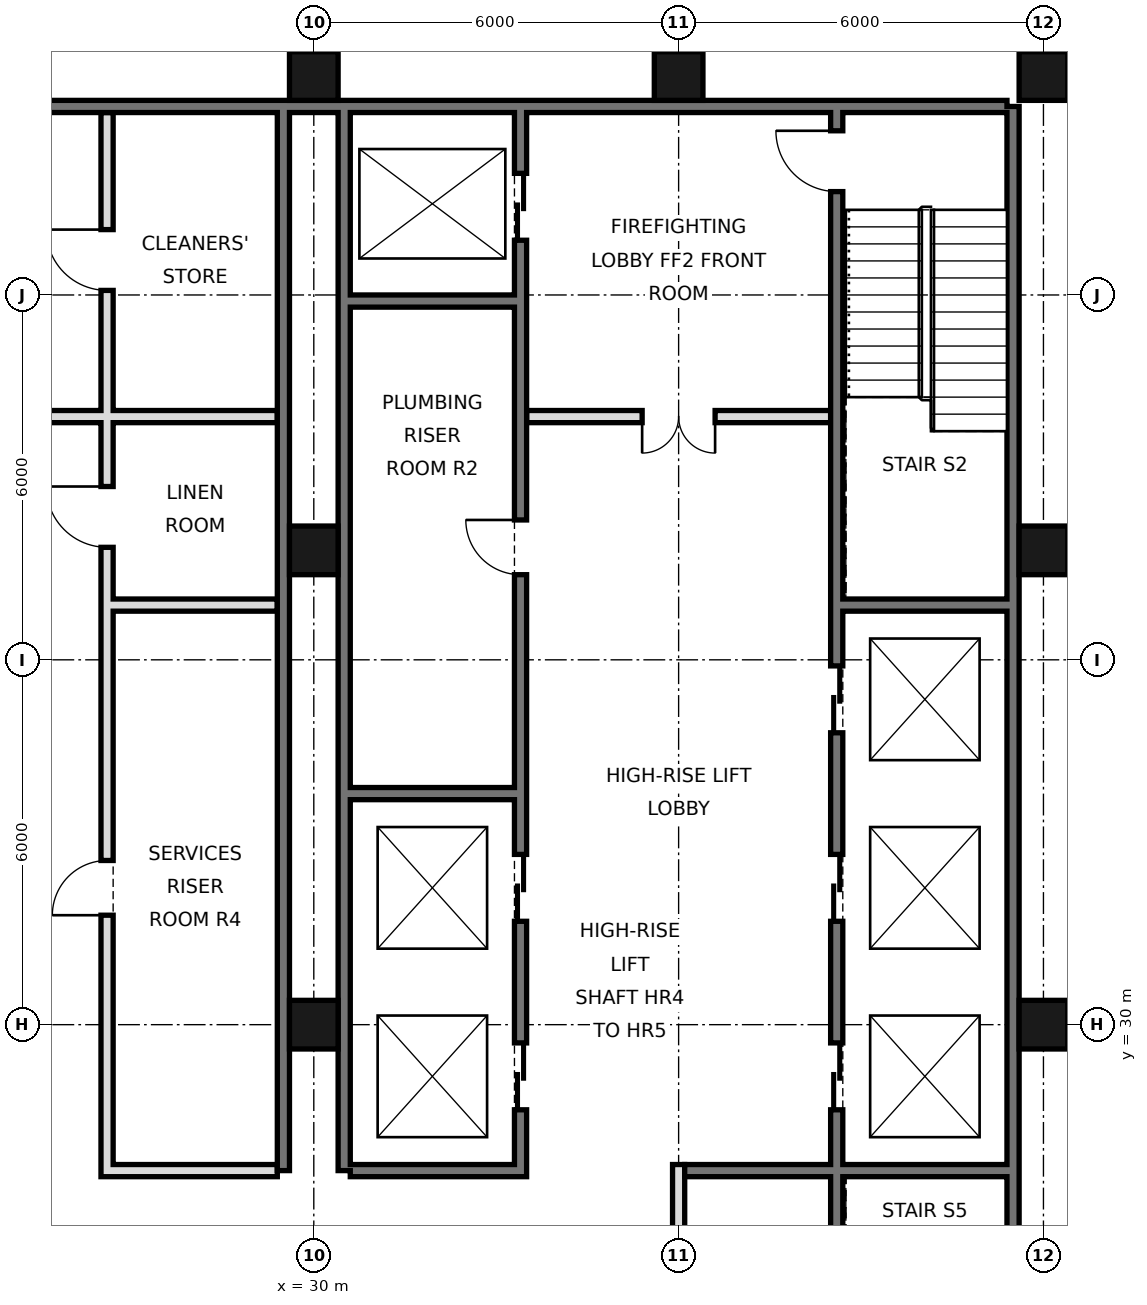
"""IFC4 building model, lengths in metres.
Left out: names, types, materials, properties, quantities, classifications, styles, units other than length and angle.
Written with IfcOpenShell. Run it as: python <this file> out.ifc"""

import sys

from ifc_helpers import new_model, si_unit, direction, frame, frame_2d, origin, origin_2d, place, context, subcontext, project, spatial, rectangle, hollow_rectangle, extrude, element, fill, save


model = new_model("IFC4")
c1 = context("Model", 3, precision=1e-05, world=origin(), true_north=direction((0.0, 1.0)))
c2 = subcontext(c1, "Body", "Model", "MODEL_VIEW")
j1 = project(units=[si_unit("LENGTHUNIT", "METRE"), si_unit("PLANEANGLEUNIT", "RADIAN")], contexts=[c1])
p1 = place(None, origin())
s1 = spatial("IfcSite", under=j1, at=p1, CompositionType="ELEMENT")
p2 = place(p1, origin())
s2 = spatial("IfcBuilding", under=s1, at=p2, CompositionType="ELEMENT")
p3 = place(p2, frame((0.0, 0.0, 326.8)))
s3 = spatial("IfcBuildingStorey", under=s2, at=p3, CompositionType="ELEMENT", Elevation=326.8)
for number, where, z_axis, x_axis in (
    (1, (30.0, 30.0, 0.0), (0.0, 0.0, 1.0), (1.0, 0.0, 0.0)),
    (2, (30.0, 37.8, 0.0), (0.0, 0.0, 1.0), (1.0, 0.0, 0.0)),
    (3, (30.0, 45.6, 0.0), (0.0, 0.0, 1.0), (1.0, 0.0, 0.0)),
    (4, (36.0, 45.6, 0.0), (0.0, 0.0, 1.0), (1.0, 0.0, 0.0)),
    (5, (42.0, 30.0, 0.0), (0.0, 0.0, 1.0), (1.0, 0.0, 0.0)),
    (6, (42.0, 37.8, 0.0), (0.0, 0.0, 1.0), (1.0, 0.0, 0.0)),
    (7, (42.0, 45.6, 0.0), (0.0, 0.0, 1.0), (1.0, 0.0, 0.0)),
):
    element("IfcColumn", number, at=place(p3, frame(where, z_axis=z_axis, x_axis=x_axis)), inside=s3, PredefinedType="COLUMN", context=c2, shape_type="SweptSolid", body=[
        extrude(hollow_rectangle(XDim=0.8, YDim=0.8, WallThickness=0.025, at=origin_2d()), origin(), (0.0, 0.0, 1.0), 4.4),
    ])
p4 = place(p3, frame((41.5, 21.6, 0.0), z_axis=(0.0, 0.0, 1.0), x_axis=(0.0, 1.0, 0.0)))
e8 = element("IfcWall", 8, at=p4, inside=s3, PredefinedType="SOLIDWALL", context=c2, shape_type="SweptSolid", body=[
    extrude(rectangle(XDim=23.5, YDim=0.2, at=frame_2d((11.75, 0.0))), origin(), (0.0, 0.0, 1.0), 4.1),
])
p5 = place(p3, frame((6.6, 45.1, 0.0), z_axis=(0.0, 0.0, 1.0), x_axis=(1.0, 0.0, 0.0)))
e9 = element("IfcWall", 9, at=p5, inside=s3, PredefinedType="SOLIDWALL", context=c2, shape_type="SweptSolid", body=[
    extrude(rectangle(XDim=34.8, YDim=0.2, at=frame_2d((17.4, 0.0))), origin(), (0.0, 0.0, 1.0), 4.1),
])
for number, where, z_axis, x_axis in (
    (10, (29.5, 27.6, 0.0), (0.0, 0.0, 1.0), (0.0, 1.0, 0.0)),
    (11, (30.5, 27.6, 0.0), (0.0, 0.0, 1.0), (0.0, 1.0, 0.0)),
):
    element("IfcWall", number, at=place(p3, frame(where, z_axis=z_axis, x_axis=x_axis)), inside=s3, PredefinedType="SOLIDWALL", context=c2, shape_type="SweptSolid", body=[
        extrude(rectangle(XDim=17.5, YDim=0.2, at=frame_2d((8.75, 0.0))), origin(), (0.0, 0.0, 1.0), 4.1),
    ])
p6 = place(p3, frame((26.6, 27.5, 0.0), z_axis=(0.0, 0.0, 1.0), x_axis=(0.0, 1.0, 0.0)))
e12 = element("IfcWall", 12, at=p6, inside=s3, PredefinedType="SOLIDWALL", context=c2, shape_type="SweptSolid", body=[
    extrude(rectangle(XDim=17.5, YDim=0.2, at=frame_2d((8.75, 0.0))), origin(), (0.0, 0.0, 1.0), 4.1),
])
p7 = place(p6, frame((4.3, 0.0, 0.0)))
e13 = element("IfcOpeningElement", 13, at=p7, cuts=e12, PredefinedType="OPENING", context=c2, shape_type="SweptSolid", body=[
    extrude(rectangle(XDim=0.9, YDim=2.1, at=frame_2d((0.45, 1.05))), frame((0.0, 0.11, 0.0), z_axis=(0.0, -1.0, 0.0), x_axis=(1.0, 0.0, 0.0)), (0.0, 0.0, 1.0), 0.22),
])
p8 = place(p6, frame((10.35, 0.0, 0.0)))
e14 = element("IfcOpeningElement", 14, at=p8, cuts=e12, PredefinedType="OPENING", context=c2, shape_type="SweptSolid", body=[
    extrude(rectangle(XDim=1.0, YDim=2.1, at=frame_2d((0.5, 1.05))), frame((0.0, 0.11, 0.0), z_axis=(0.0, -1.0, 0.0), x_axis=(1.0, 0.0, 0.0)), (0.0, 0.0, 1.0), 0.22),
])
p9 = place(p6, frame((14.575, 0.0, 0.0)))
e15 = element("IfcOpeningElement", 15, at=p9, cuts=e12, PredefinedType="OPENING", context=c2, shape_type="SweptSolid", body=[
    extrude(rectangle(XDim=1.0, YDim=2.1, at=frame_2d((0.5, 1.05))), frame((0.0, 0.11, 0.0), z_axis=(0.0, -1.0, 0.0), x_axis=(1.0, 0.0, 0.0)), (0.0, 0.0, 1.0), 0.22),
])
p10 = place(p3, frame((33.4, 27.5, 0.0), z_axis=(0.0, 0.0, 1.0), x_axis=(0.0, 1.0, 0.0)))
e16 = element("IfcWall", 16, at=p10, inside=s3, PredefinedType="SOLIDWALL", context=c2, shape_type="SweptSolid", body=[
    extrude(rectangle(XDim=17.5, YDim=0.2, at=frame_2d((8.75, 0.0))), origin(), (0.0, 0.0, 1.0), 4.1),
])
p11 = place(p10, frame((1.1, 0.0, 0.0)))
e17 = element("IfcOpeningElement", 17, at=p11, cuts=e16, PredefinedType="OPENING", context=c2, shape_type="SweptSolid", body=[
    extrude(rectangle(XDim=1.1, YDim=2.1, at=frame_2d((0.55, 1.05))), frame((0.0, 0.11, 0.0), z_axis=(0.0, -1.0, 0.0), x_axis=(1.0, 0.0, 0.0)), (0.0, 0.0, 1.0), 0.22),
])
p12 = place(p10, frame((4.2, 0.0, 0.0)))
e18 = element("IfcOpeningElement", 18, at=p12, cuts=e16, PredefinedType="OPENING", context=c2, shape_type="SweptSolid", body=[
    extrude(rectangle(XDim=1.1, YDim=2.1, at=frame_2d((0.55, 1.05))), frame((0.0, 0.11, 0.0), z_axis=(0.0, -1.0, 0.0), x_axis=(1.0, 0.0, 0.0)), (0.0, 0.0, 1.0), 0.22),
])
p13 = place(p10, frame((15.4, 0.0, 0.0)))
e19 = element("IfcOpeningElement", 19, at=p13, cuts=e16, PredefinedType="OPENING", context=c2, shape_type="SweptSolid", body=[
    extrude(rectangle(XDim=1.1, YDim=2.1, at=frame_2d((0.55, 1.05))), frame((0.0, 0.11, 0.0), z_axis=(0.0, -1.0, 0.0), x_axis=(1.0, 0.0, 0.0)), (0.0, 0.0, 1.0), 0.22),
])
p14 = place(p10, frame((9.9, 0.0, 0.0)))
e20 = element("IfcOpeningElement", 20, at=p14, cuts=e16, PredefinedType="OPENING", context=c2, shape_type="SweptSolid", body=[
    extrude(rectangle(XDim=0.9, YDim=2.1, at=frame_2d((0.45, 1.05))), frame((0.0, 0.11, 0.0), z_axis=(0.0, -1.0, 0.0), x_axis=(1.0, 0.0, 0.0)), (0.0, 0.0, 1.0), 0.22),
])
p15 = place(p3, frame((36.0, 21.6, 0.0), z_axis=(0.0, 0.0, 1.0), x_axis=(0.0, 1.0, 0.0)))
e21 = element("IfcWall", 21, at=p15, inside=s3, PredefinedType="PARTITIONING", context=c2, shape_type="SweptSolid", body=[
    extrude(rectangle(XDim=6.1, YDim=0.2, at=frame_2d((3.05, 0.0))), origin(), (0.0, 0.0, 1.0), 4.1),
])
p16 = place(p3, frame((38.6, 21.6, 0.0), z_axis=(0.0, 0.0, 1.0), x_axis=(0.0, 1.0, 0.0)))
e22 = element("IfcWall", 22, at=p16, inside=s3, PredefinedType="SOLIDWALL", context=c2, shape_type="SweptSolid", body=[
    extrude(rectangle(XDim=23.4, YDim=0.2, at=frame_2d((11.7, 0.0))), origin(), (0.0, 0.0, 1.0), 4.1),
])
p17 = place(p16, frame((7.0, 0.0, 0.0)))
e23 = element("IfcOpeningElement", 23, at=p17, cuts=e22, PredefinedType="OPENING", context=c2, shape_type="SweptSolid", body=[
    extrude(rectangle(XDim=1.1, YDim=2.1, at=frame_2d((0.55, 1.05))), frame((0.0, 0.11, 0.0), z_axis=(0.0, -1.0, 0.0), x_axis=(1.0, 0.0, 0.0)), (0.0, 0.0, 1.0), 0.22),
])
p18 = place(p16, frame((10.1, 0.0, 0.0)))
e24 = element("IfcOpeningElement", 24, at=p18, cuts=e22, PredefinedType="OPENING", context=c2, shape_type="SweptSolid", body=[
    extrude(rectangle(XDim=1.1, YDim=2.1, at=frame_2d((0.55, 1.05))), frame((0.0, 0.11, 0.0), z_axis=(0.0, -1.0, 0.0), x_axis=(1.0, 0.0, 0.0)), (0.0, 0.0, 1.0), 0.22),
])
p19 = place(p16, frame((13.2, 0.0, 0.0)))
e25 = element("IfcOpeningElement", 25, at=p19, cuts=e22, PredefinedType="OPENING", context=c2, shape_type="SweptSolid", body=[
    extrude(rectangle(XDim=1.1, YDim=2.1, at=frame_2d((0.55, 1.05))), frame((0.0, 0.11, 0.0), z_axis=(0.0, -1.0, 0.0), x_axis=(1.0, 0.0, 0.0)), (0.0, 0.0, 1.0), 0.22),
])
p20 = place(p16, frame((22.1, 0.0, 0.0)))
e26 = element("IfcOpeningElement", 26, at=p20, cuts=e22, PredefinedType="OPENING", context=c2, shape_type="SweptSolid", body=[
    extrude(rectangle(XDim=1.0, YDim=2.1, at=frame_2d((0.5, 1.05))), frame((0.0, 0.11, 0.0), z_axis=(0.0, -1.0, 0.0), x_axis=(1.0, 0.0, 0.0)), (0.0, 0.0, 1.0), 0.22),
])
p21 = place(p16, frame((0.175, 0.0, 0.0)))
e27 = element("IfcOpeningElement", 27, at=p21, cuts=e22, PredefinedType="OPENING", context=c2, shape_type="SweptSolid", body=[
    extrude(rectangle(XDim=0.9, YDim=2.1, at=frame_2d((0.45, 1.05))), frame((0.0, 0.11, 0.0), z_axis=(0.0, -1.0, 0.0), x_axis=(1.0, 0.0, 0.0)), (0.0, 0.0, 1.0), 0.22),
])
for number, where, z_axis, x_axis in (
    (28, (26.7, 27.6, 0.0), (0.0, 0.0, 1.0), (1.0, 0.0, 0.0)),
    (29, (30.6, 27.6, 0.0), (0.0, 0.0, 1.0), (1.0, 0.0, 0.0)),
):
    element("IfcWall", number, at=place(p3, frame(where, z_axis=z_axis, x_axis=x_axis)), inside=s3, PredefinedType="SOLIDWALL", context=c2, shape_type="SweptSolid", body=[
        extrude(rectangle(XDim=2.7, YDim=0.2, at=frame_2d((1.35, 0.0))), origin(), (0.0, 0.0, 1.0), 4.1),
    ])
p22 = place(p3, frame((36.1, 27.6, 0.0), z_axis=(0.0, 0.0, 1.0), x_axis=(1.0, 0.0, 0.0)))
e30 = element("IfcWall", 30, at=p22, inside=s3, PredefinedType="SOLIDWALL", context=c2, shape_type="SweptSolid", body=[
    extrude(rectangle(XDim=5.3, YDim=0.2, at=frame_2d((2.65, 0.0))), origin(), (0.0, 0.0, 1.0), 4.1),
])
for number, where, z_axis, x_axis in (
    (31, (30.6, 33.8, 0.0), (0.0, 0.0, 1.0), (1.0, 0.0, 0.0)),
    (32, (26.7, 36.9, 0.0), (0.0, 0.0, 1.0), (1.0, 0.0, 0.0)),
    (33, (38.7, 36.9, 0.0), (0.0, 0.0, 1.0), (1.0, 0.0, 0.0)),
):
    element("IfcWall", number, at=place(p3, frame(where, z_axis=z_axis, x_axis=x_axis)), inside=s3, PredefinedType="SOLIDWALL", context=c2, shape_type="SweptSolid", body=[
        extrude(rectangle(XDim=2.7, YDim=0.2, at=frame_2d((1.35, 0.0))), origin(), (0.0, 0.0, 1.0), 4.1),
    ])
p23 = place(p3, frame((21.5, 40.0, 0.0), z_axis=(0.0, 0.0, 1.0), x_axis=(1.0, 0.0, 0.0)))
e34 = element("IfcWall", 34, at=p23, inside=s3, PredefinedType="PARTITIONING", context=c2, shape_type="SweptSolid", body=[
    extrude(rectangle(XDim=7.9, YDim=0.2, at=frame_2d((3.95, 0.0))), origin(), (0.0, 0.0, 1.0), 4.1),
])
p24 = place(p23, frame((1.9, 0.0, 0.0)))
e35 = element("IfcOpeningElement", 35, at=p24, cuts=e34, PredefinedType="OPENING", context=c2, shape_type="SweptSolid", body=[
    extrude(rectangle(XDim=1.2, YDim=2.1, at=frame_2d((0.6, 1.05))), frame((0.0, 0.11, 0.0), z_axis=(0.0, -1.0, 0.0), x_axis=(1.0, 0.0, 0.0)), (0.0, 0.0, 1.0), 0.22),
])
p25 = place(p3, frame((33.5, 40.0, 0.0), z_axis=(0.0, 0.0, 1.0), x_axis=(1.0, 0.0, 0.0)))
e36 = element("IfcWall", 36, at=p25, inside=s3, PredefinedType="PARTITIONING", context=c2, shape_type="SweptSolid", body=[
    extrude(rectangle(XDim=5.0, YDim=0.2, at=frame_2d((2.5, 0.0))), origin(), (0.0, 0.0, 1.0), 4.1),
])
p26 = place(p25, frame((1.9, 0.0, 0.0)))
e37 = element("IfcOpeningElement", 37, at=p26, cuts=e36, PredefinedType="OPENING", context=c2, shape_type="SweptSolid", body=[
    extrude(rectangle(XDim=1.2, YDim=2.1, at=frame_2d((0.6, 1.05))), frame((0.0, 0.11, 0.0), z_axis=(0.0, -1.0, 0.0), x_axis=(1.0, 0.0, 0.0)), (0.0, 0.0, 1.0), 0.22),
])
p27 = place(p3, frame((30.6, 41.9, 0.0), z_axis=(0.0, 0.0, 1.0), x_axis=(1.0, 0.0, 0.0)))
e38 = element("IfcWall", 38, at=p27, inside=s3, PredefinedType="SOLIDWALL", context=c2, shape_type="SweptSolid", body=[
    extrude(rectangle(XDim=2.7, YDim=0.2, at=frame_2d((1.35, 0.0))), origin(), (0.0, 0.0, 1.0), 4.1),
])
p28 = place(p26, frame((1.2, 0.0, 0.0), z_axis=(0.0, 0.0, 1.0), x_axis=(-1.0, 0.0, 0.0)))
e39 = element("IfcDoor", 39, at=p28, inside=s3, OperationType="DOUBLE_DOOR_SINGLE_SWING", PredefinedType="DOOR", context=c2, shape_type="SweptSolid", body=[
    extrude(rectangle(XDim=1.2, YDim=2.1, at=frame_2d((0.6, 1.05))), frame((0.0, 0.025, 0.0), z_axis=(0.0, -1.0, 0.0), x_axis=(1.0, 0.0, 0.0)), (0.0, 0.0, 1.0), 0.05),
])
fill(e37, e39)
p29 = place(p17, origin())
e40 = element("IfcDoor", 40, at=p29, inside=s3, OperationType="DOUBLE_DOOR_SLIDING", PredefinedType="DOOR", context=c2, shape_type="SweptSolid", body=[
    extrude(rectangle(XDim=1.1, YDim=2.1, at=frame_2d((0.55, 1.05))), frame((0.0, 0.025, 0.0), z_axis=(0.0, -1.0, 0.0), x_axis=(1.0, 0.0, 0.0)), (0.0, 0.0, 1.0), 0.05),
])
fill(e23, e40)
p30 = place(p18, origin())
e41 = element("IfcDoor", 41, at=p30, inside=s3, OperationType="DOUBLE_DOOR_SLIDING", PredefinedType="DOOR", context=c2, shape_type="SweptSolid", body=[
    extrude(rectangle(XDim=1.1, YDim=2.1, at=frame_2d((0.55, 1.05))), frame((0.0, 0.025, 0.0), z_axis=(0.0, -1.0, 0.0), x_axis=(1.0, 0.0, 0.0)), (0.0, 0.0, 1.0), 0.05),
])
fill(e24, e41)
p31 = place(p19, origin())
e42 = element("IfcDoor", 42, at=p31, inside=s3, OperationType="DOUBLE_DOOR_SLIDING", PredefinedType="DOOR", context=c2, shape_type="SweptSolid", body=[
    extrude(rectangle(XDim=1.1, YDim=2.1, at=frame_2d((0.55, 1.05))), frame((0.0, 0.025, 0.0), z_axis=(0.0, -1.0, 0.0), x_axis=(1.0, 0.0, 0.0)), (0.0, 0.0, 1.0), 0.05),
])
fill(e25, e42)
p32 = place(p11, origin())
e43 = element("IfcDoor", 43, at=p32, inside=s3, OperationType="DOUBLE_DOOR_SLIDING", PredefinedType="DOOR", context=c2, shape_type="SweptSolid", body=[
    extrude(rectangle(XDim=1.1, YDim=2.1, at=frame_2d((0.55, 1.05))), frame((0.0, 0.025, 0.0), z_axis=(0.0, -1.0, 0.0), x_axis=(1.0, 0.0, 0.0)), (0.0, 0.0, 1.0), 0.05),
])
fill(e17, e43)
p33 = place(p12, origin())
e44 = element("IfcDoor", 44, at=p33, inside=s3, OperationType="DOUBLE_DOOR_SLIDING", PredefinedType="DOOR", context=c2, shape_type="SweptSolid", body=[
    extrude(rectangle(XDim=1.1, YDim=2.1, at=frame_2d((0.55, 1.05))), frame((0.0, 0.025, 0.0), z_axis=(0.0, -1.0, 0.0), x_axis=(1.0, 0.0, 0.0)), (0.0, 0.0, 1.0), 0.05),
])
fill(e18, e44)
p34 = place(p13, origin())
e45 = element("IfcDoor", 45, at=p34, inside=s3, OperationType="DOUBLE_DOOR_SLIDING", PredefinedType="DOOR", context=c2, shape_type="SweptSolid", body=[
    extrude(rectangle(XDim=1.1, YDim=2.1, at=frame_2d((0.55, 1.05))), frame((0.0, 0.025, 0.0), z_axis=(0.0, -1.0, 0.0), x_axis=(1.0, 0.0, 0.0)), (0.0, 0.0, 1.0), 0.05),
])
fill(e19, e45)
p35 = place(p20, frame((1.0, 0.0, 0.0), z_axis=(0.0, 0.0, 1.0), x_axis=(-1.0, 0.0, 0.0)))
e46 = element("IfcDoor", 46, at=p35, inside=s3, OperationType="SINGLE_SWING_LEFT", PredefinedType="DOOR", context=c2, shape_type="SweptSolid", body=[
    extrude(rectangle(XDim=1.0, YDim=2.1, at=frame_2d((0.5, 1.05))), frame((0.0, 0.025, 0.0), z_axis=(0.0, -1.0, 0.0), x_axis=(1.0, 0.0, 0.0)), (0.0, 0.0, 1.0), 0.05),
])
fill(e26, e46)
p36 = place(p14, frame((0.9, 0.0, 0.0), z_axis=(0.0, 0.0, 1.0), x_axis=(-1.0, 0.0, 0.0)))
e47 = element("IfcDoor", 47, at=p36, inside=s3, OperationType="SINGLE_SWING_LEFT", PredefinedType="DOOR", context=c2, shape_type="SweptSolid", body=[
    extrude(rectangle(XDim=0.9, YDim=2.1, at=frame_2d((0.45, 1.05))), frame((0.0, 0.025, 0.0), z_axis=(0.0, -1.0, 0.0), x_axis=(1.0, 0.0, 0.0)), (0.0, 0.0, 1.0), 0.05),
])
fill(e20, e47)
p37 = place(p7, origin())
e48 = element("IfcDoor", 48, at=p37, inside=s3, OperationType="SINGLE_SWING_LEFT", PredefinedType="DOOR", context=c2, shape_type="SweptSolid", body=[
    extrude(rectangle(XDim=0.9, YDim=2.1, at=frame_2d((0.45, 1.05))), frame((0.0, 0.025, 0.0), z_axis=(0.0, -1.0, 0.0), x_axis=(1.0, 0.0, 0.0)), (0.0, 0.0, 1.0), 0.05),
])
fill(e13, e48)
p38 = place(p8, frame((1.0, 0.0, 0.0), z_axis=(0.0, 0.0, 1.0), x_axis=(-1.0, 0.0, 0.0)))
e49 = element("IfcDoor", 49, at=p38, inside=s3, OperationType="SINGLE_SWING_LEFT", PredefinedType="DOOR", context=c2, shape_type="SweptSolid", body=[
    extrude(rectangle(XDim=1.0, YDim=2.1, at=frame_2d((0.5, 1.05))), frame((0.0, 0.025, 0.0), z_axis=(0.0, -1.0, 0.0), x_axis=(1.0, 0.0, 0.0)), (0.0, 0.0, 1.0), 0.05),
])
fill(e14, e49)
p39 = place(p9, frame((1.0, 0.0, 0.0), z_axis=(0.0, 0.0, 1.0), x_axis=(-1.0, 0.0, 0.0)))
e50 = element("IfcDoor", 50, at=p39, inside=s3, OperationType="SINGLE_SWING_LEFT", PredefinedType="DOOR", context=c2, shape_type="SweptSolid", body=[
    extrude(rectangle(XDim=1.0, YDim=2.1, at=frame_2d((0.5, 1.05))), frame((0.0, 0.025, 0.0), z_axis=(0.0, -1.0, 0.0), x_axis=(1.0, 0.0, 0.0)), (0.0, 0.0, 1.0), 0.05),
])
fill(e15, e50)
save(model, sys.argv[1])
